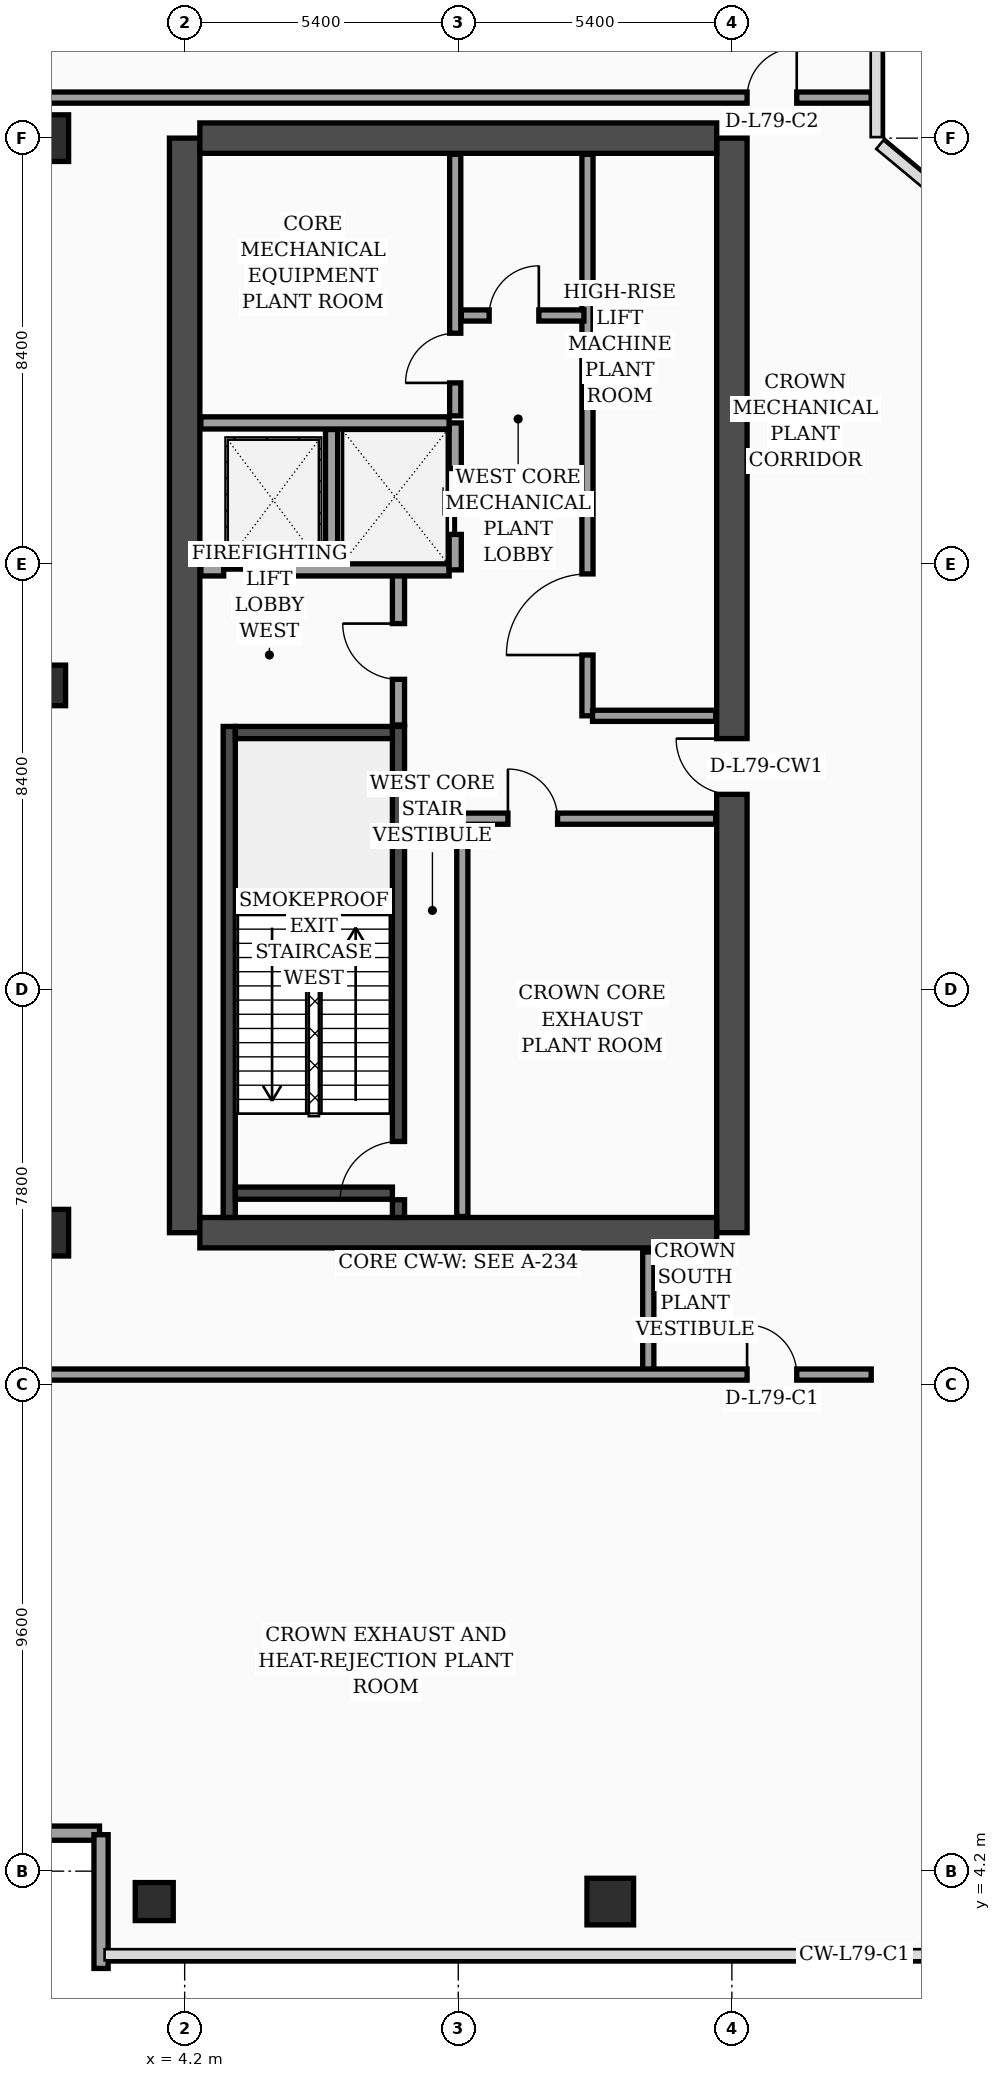
"""IFC4 building model, lengths in metres.
Left out: names, types, materials, properties, quantities, classifications, styles, units other than length and angle.
Written with IfcOpenShell. Run it as: python <this file> out.ifc"""

import sys

from ifc_helpers import new_model, si_unit, direction, frame, frame_2d, origin, origin_2d, place, context, subcontext, project, spatial, rectangle, hollow_rectangle, extrude, element, fill, save


model = new_model("IFC4")
c1 = context("Model", 3, precision=1e-05, world=origin(), true_north=direction((0.0, 1.0)))
c2 = subcontext(c1, "Body", "Model", "MODEL_VIEW")
j1 = project(units=[si_unit("LENGTHUNIT", "METRE"), si_unit("PLANEANGLEUNIT", "RADIAN")], contexts=[c1])
p1 = place(None, origin())
s1 = spatial("IfcSite", under=j1, at=p1, CompositionType="ELEMENT")
p2 = place(p1, origin())
s2 = spatial("IfcBuilding", under=s1, at=p2, CompositionType="ELEMENT")
p3 = place(p2, frame((0.0, 0.0, 320.5)))
s3 = spatial("IfcBuildingStorey", under=s2, at=p3, CompositionType="ELEMENT", Elevation=320.5)
p4 = place(p3, frame((4.2, 16.8, 0.0), z_axis=(0.0, 0.0, 1.0), x_axis=(0.0, 1.0, 0.0)))
e1 = element("IfcWall", 1, at=p4, inside=s3, PredefinedType="SHEAR", context=c2, shape_type="SweptSolid", body=[
    extrude(rectangle(XDim=21.6, YDim=0.6, at=frame_2d((10.8, 0.0))), origin(), (0.0, 0.0, 1.0), 4.76),
])
p5 = place(p3, frame((15.0, 16.8, 0.0), z_axis=(0.0, 0.0, 1.0), x_axis=(0.0, 1.0, 0.0)))
e2 = element("IfcWall", 2, at=p5, inside=s3, PredefinedType="SHEAR", context=c2, shape_type="SweptSolid", body=[
    extrude(rectangle(XDim=21.6, YDim=0.6, at=frame_2d((10.8, 0.0))), origin(), (0.0, 0.0, 1.0), 4.76),
])
p6 = place(p5, frame((8.65, 0.0, 0.0)))
e3 = element("IfcOpeningElement", 3, at=p6, cuts=e2, PredefinedType="OPENING", context=c2, shape_type="SweptSolid", body=[
    extrude(rectangle(XDim=1.1, YDim=2.2, at=frame_2d((0.55, 1.1))), frame((0.0, 0.31, 0.0), z_axis=(0.0, -1.0, 0.0), x_axis=(1.0, 0.0, 0.0)), (0.0, 0.0, 1.0), 0.62),
])
for number, where, z_axis, x_axis in (
    (4, (4.5, 38.4, 0.0), (0.0, 0.0, 1.0), (1.0, 0.0, 0.0)),
    (5, (4.5, 16.8, 0.0), (0.0, 0.0, 1.0), (1.0, 0.0, 0.0)),
):
    element("IfcWall", number, at=place(p3, frame(where, z_axis=z_axis, x_axis=x_axis)), inside=s3, PredefinedType="SHEAR", context=c2, shape_type="SweptSolid", body=[
        extrude(rectangle(XDim=10.2, YDim=0.6, at=frame_2d((5.1, 0.0))), origin(), (0.0, 0.0, 1.0), 4.76),
    ])
p7 = place(p3, frame((5.08, 17.1, 0.0), z_axis=(0.0, 0.0, 1.0), x_axis=(0.0, 1.0, 0.0)))
e6 = element("IfcWall", 6, at=p7, inside=s3, PredefinedType="SOLIDWALL", context=c2, shape_type="SweptSolid", body=[
    extrude(rectangle(XDim=9.69, YDim=0.24, at=frame_2d((4.845, 0.0))), origin(), (0.0, 0.0, 1.0), 4.76),
])
p8 = place(p3, frame((8.42, 17.1, 0.0), z_axis=(0.0, 0.0, 1.0), x_axis=(0.0, 1.0, 0.0)))
e7 = element("IfcWall", 7, at=p8, inside=s3, PredefinedType="SOLIDWALL", context=c2, shape_type="SweptSolid", body=[
    extrude(rectangle(XDim=9.69, YDim=0.24, at=frame_2d((4.845, 0.0))), origin(), (0.0, 0.0, 1.0), 4.76),
])
p9 = place(p8, frame((0.35, 0.0, 0.0)))
e8 = element("IfcOpeningElement", 8, at=p9, cuts=e7, PredefinedType="OPENING", context=c2, shape_type="SweptSolid", body=[
    extrude(rectangle(XDim=1.15, YDim=2.2, at=frame_2d((0.575, 1.1))), frame((0.0, 0.13, 0.0), z_axis=(0.0, -1.0, 0.0), x_axis=(1.0, 0.0, 0.0)), (0.0, 0.0, 1.0), 0.26),
])
for number, where, z_axis, x_axis in (
    (9, (5.2, 17.58, 0.0), (0.0, 0.0, 1.0), (1.0, 0.0, 0.0)),
    (10, (5.2, 26.67, 0.0), (0.0, 0.0, 1.0), (1.0, 0.0, 0.0)),
):
    element("IfcWall", number, at=place(p3, frame(where, z_axis=z_axis, x_axis=x_axis)), inside=s3, PredefinedType="SOLIDWALL", context=c2, shape_type="SweptSolid", body=[
        extrude(rectangle(XDim=3.1, YDim=0.24, at=frame_2d((1.55, 0.0))), origin(), (0.0, 0.0, 1.0), 4.76),
    ])
p10 = place(p3, frame((3.6, 3.6, 0.0), z_axis=(0.0, 0.0, 1.0), x_axis=(1.0, 0.0, 0.0)))
e11 = element("IfcColumn", 11, at=p10, inside=s3, PredefinedType="COLUMN", context=c2, shape_type="SweptSolid", body=[
    extrude(hollow_rectangle(XDim=0.75, YDim=0.75, WallThickness=0.032, at=origin_2d()), origin(), (0.0, 0.0, 1.0), 4.76),
])
p11 = place(p3, frame((1.45, 16.8, 0.0), z_axis=(0.0, 0.0, 1.0), x_axis=(1.0, 0.0, 0.0)))
e12 = element("IfcColumn", 12, at=p11, inside=s3, PredefinedType="COLUMN", context=c2, shape_type="SweptSolid", body=[
    extrude(rectangle(XDim=0.92, YDim=0.92, at=origin_2d()), origin(), (0.0, 0.0, 1.0), 4.76),
])
p12 = place(p3, frame((1.45, 27.6, 0.0), z_axis=(0.0, 0.0, 1.0), x_axis=(1.0, 0.0, 0.0)))
e13 = element("IfcColumn", 13, at=p12, inside=s3, PredefinedType="COLUMN", context=c2, shape_type="SweptSolid", body=[
    extrude(rectangle(XDim=0.8, YDim=0.8, at=origin_2d()), origin(), (0.0, 0.0, 1.0), 4.76),
])
for number, where, z_axis, x_axis in (
    (14, (1.45, 38.4, 0.0), (0.0, 0.0, 1.0), (1.0, 0.0, 0.0)),
    (15, (12.6, 3.6, 0.0), (0.0, 0.0, 1.0), (1.0, 0.0, 0.0)),
):
    element("IfcColumn", number, at=place(p3, frame(where, z_axis=z_axis, x_axis=x_axis)), inside=s3, PredefinedType="COLUMN", context=c2, shape_type="SweptSolid", body=[
        extrude(rectangle(XDim=0.92, YDim=0.92, at=origin_2d()), origin(), (0.0, 0.0, 1.0), 4.76),
    ])
p13 = place(p3, frame((-0.12, 4.95, 0.0), z_axis=(0.0, 0.0, 1.0), x_axis=(1.0, 0.0, 0.0)))
e16 = element("IfcWall", 16, at=p13, inside=s3, PredefinedType="SOLIDWALL", context=c2, shape_type="SweptSolid", body=[
    extrude(rectangle(XDim=2.64, YDim=0.28, at=frame_2d((1.32, 0.0))), origin(), (0.0, 0.0, 1.0), 4.76),
])
p14 = place(p3, frame((2.55, 4.92, 0.0), z_axis=(0.0, 0.0, 1.0), x_axis=(0.0, -1.0, 0.0)))
e17 = element("IfcWall", 17, at=p14, inside=s3, PredefinedType="SOLIDWALL", context=c2, shape_type="SweptSolid", body=[
    extrude(rectangle(XDim=2.64, YDim=0.28, at=frame_2d((1.32, 0.0))), origin(), (0.0, 0.0, 1.0), 4.76),
])
p15 = place(p3, frame((8.42, 26.82, 0.0), z_axis=(0.0, 0.0, 1.0), x_axis=(0.0, 1.0, 0.0)))
e18 = element("IfcWall", 18, at=p15, inside=s3, PredefinedType="SOLIDWALL", context=c2, shape_type="SweptSolid", body=[
    extrude(rectangle(XDim=3.0, YDim=0.24, at=frame_2d((1.5, 0.0))), origin(), (0.0, 0.0, 1.0), 4.76),
])
p16 = place(p15, frame((0.9, 0.0, 0.0)))
e19 = element("IfcOpeningElement", 19, at=p16, cuts=e18, PredefinedType="OPENING", context=c2, shape_type="SweptSolid", body=[
    extrude(rectangle(XDim=1.1, YDim=2.2, at=frame_2d((0.55, 1.1))), frame((0.0, 0.13, 0.0), z_axis=(0.0, -1.0, 0.0), x_axis=(1.0, 0.0, 0.0)), (0.0, 0.0, 1.0), 0.26),
])
p17 = place(p3, frame((4.52, 29.88, 0.0), z_axis=(0.0, 0.0, 1.0), x_axis=(1.0, 0.0, 0.0)))
e20 = element("IfcWall", 20, at=p17, inside=s3, PredefinedType="SOLIDWALL", context=c2, shape_type="SweptSolid", body=[
    extrude(rectangle(XDim=4.9, YDim=0.24, at=frame_2d((2.45, 0.0))), origin(), (0.0, 0.0, 1.0), 4.76),
])
p18 = place(p17, frame((0.45, 0.0, 0.0)))
e21 = element("IfcOpeningElement", 21, at=p18, cuts=e20, PredefinedType="OPENING", context=c2, shape_type="SweptSolid", body=[
    extrude(rectangle(XDim=1.3, YDim=2.35, at=frame_2d((0.65, 1.175))), frame((0.0, 0.13, 0.0), z_axis=(0.0, -1.0, 0.0), x_axis=(1.0, 0.0, 0.0)), (0.0, 0.0, 1.0), 0.26),
])
p19 = place(p3, frame((7.1, 30.02, 0.0), z_axis=(0.0, 0.0, 1.0), x_axis=(0.0, 1.0, 0.0)))
e22 = element("IfcWall", 22, at=p19, inside=s3, PredefinedType="SOLIDWALL", context=c2, shape_type="SweptSolid", body=[
    extrude(rectangle(XDim=2.63, YDim=0.24, at=frame_2d((1.315, 0.0))), origin(), (0.0, 0.0, 1.0), 4.76),
])
p20 = place(p3, frame((9.54, 29.88, 0.0), z_axis=(0.0, 0.0, 1.0), x_axis=(0.0, 1.0, 0.0)))
e23 = element("IfcWall", 23, at=p20, inside=s3, PredefinedType="SOLIDWALL", context=c2, shape_type="SweptSolid", body=[
    extrude(rectangle(XDim=2.9, YDim=0.24, at=frame_2d((1.45, 0.0))), origin(), (0.0, 0.0, 1.0), 4.76),
])
p21 = place(p20, frame((0.7, 0.0, 0.0)))
e24 = element("IfcOpeningElement", 24, at=p21, cuts=e23, PredefinedType="OPENING", context=c2, shape_type="SweptSolid", body=[
    extrude(rectangle(XDim=1.3, YDim=2.35, at=frame_2d((0.65, 1.175))), frame((0.0, 0.13, 0.0), z_axis=(0.0, -1.0, 0.0), x_axis=(1.0, 0.0, 0.0)), (0.0, 0.0, 1.0), 0.26),
])
p22 = place(p3, frame((4.52, 32.78, 0.0), z_axis=(0.0, 0.0, 1.0), x_axis=(1.0, 0.0, 0.0)))
e25 = element("IfcWall", 25, at=p22, inside=s3, PredefinedType="SOLIDWALL", context=c2, shape_type="SweptSolid", body=[
    extrude(rectangle(XDim=4.9, YDim=0.24, at=frame_2d((2.45, 0.0))), origin(), (0.0, 0.0, 1.0), 4.76),
])
p23 = place(p3, frame((9.68, 17.12, 0.0), z_axis=(0.0, 0.0, 1.0), x_axis=(0.0, 1.0, 0.0)))
e26 = element("IfcWall", 26, at=p23, inside=s3, PredefinedType="SOLIDWALL", context=c2, shape_type="SweptSolid", body=[
    extrude(rectangle(XDim=7.88, YDim=0.22, at=frame_2d((3.94, 0.0))), origin(), (0.0, 0.0, 1.0), 4.76),
])
p24 = place(p3, frame((9.54, 32.92, 0.0), z_axis=(0.0, 0.0, 1.0), x_axis=(0.0, 1.0, 0.0)))
e27 = element("IfcWall", 27, at=p24, inside=s3, PredefinedType="SOLIDWALL", context=c2, shape_type="SweptSolid", body=[
    extrude(rectangle(XDim=5.16, YDim=0.22, at=frame_2d((2.58, 0.0))), origin(), (0.0, 0.0, 1.0), 4.76),
])
p25 = place(p24, frame((0.65, 0.0, 0.0)))
e28 = element("IfcOpeningElement", 28, at=p25, cuts=e27, PredefinedType="OPENING", context=c2, shape_type="SweptSolid", body=[
    extrude(rectangle(XDim=0.98, YDim=2.15, at=frame_2d((0.49, 1.075))), frame((0.0, 0.12, 0.0), z_axis=(0.0, -1.0, 0.0), x_axis=(1.0, 0.0, 0.0)), (0.0, 0.0, 1.0), 0.24),
])
p26 = place(p3, frame((9.68, 24.97, 0.0), z_axis=(0.0, 0.0, 1.0), x_axis=(1.0, 0.0, 0.0)))
e29 = element("IfcWall", 29, at=p26, inside=s3, PredefinedType="SOLIDWALL", context=c2, shape_type="SweptSolid", body=[
    extrude(rectangle(XDim=5.0, YDim=0.22, at=frame_2d((2.5, 0.0))), origin(), (0.0, 0.0, 1.0), 4.76),
])
p27 = place(p26, frame((0.9, 0.0, 0.0)))
e30 = element("IfcOpeningElement", 30, at=p27, cuts=e29, PredefinedType="OPENING", context=c2, shape_type="SweptSolid", body=[
    extrude(rectangle(XDim=0.98, YDim=2.15, at=frame_2d((0.49, 1.075))), frame((0.0, 0.12, 0.0), z_axis=(0.0, -1.0, 0.0), x_axis=(1.0, 0.0, 0.0)), (0.0, 0.0, 1.0), 0.24),
])
p28 = place(p3, frame((12.15, 27.0, 0.0), z_axis=(0.0, 0.0, 1.0), x_axis=(0.0, 1.0, 0.0)))
e31 = element("IfcWall", 31, at=p28, inside=s3, PredefinedType="SOLIDWALL", context=c2, shape_type="SweptSolid", body=[
    extrude(rectangle(XDim=11.08, YDim=0.22, at=frame_2d((5.54, 0.0))), origin(), (0.0, 0.0, 1.0), 4.76),
])
p29 = place(p28, frame((1.2, 0.0, 0.0)))
e32 = element("IfcOpeningElement", 32, at=p29, cuts=e31, PredefinedType="OPENING", context=c2, shape_type="SweptSolid", body=[
    extrude(rectangle(XDim=1.6, YDim=2.35, at=frame_2d((0.8, 1.175))), frame((0.0, 0.12, 0.0), z_axis=(0.0, -1.0, 0.0), x_axis=(1.0, 0.0, 0.0)), (0.0, 0.0, 1.0), 0.24),
])
p30 = place(p3, frame((12.25, 27.0, 0.0), z_axis=(0.0, 0.0, 1.0), x_axis=(1.0, 0.0, 0.0)))
e33 = element("IfcWall", 33, at=p30, inside=s3, PredefinedType="SOLIDWALL", context=c2, shape_type="SweptSolid", body=[
    extrude(rectangle(XDim=2.43, YDim=0.22, at=frame_2d((1.215, 0.0))), origin(), (0.0, 0.0, 1.0), 4.76),
])
p31 = place(p3, frame((9.66, 34.9, 0.0), z_axis=(0.0, 0.0, 1.0), x_axis=(1.0, 0.0, 0.0)))
e34 = element("IfcWall", 34, at=p31, inside=s3, PredefinedType="SOLIDWALL", context=c2, shape_type="SweptSolid", body=[
    extrude(rectangle(XDim=2.42, YDim=0.22, at=frame_2d((1.21, 0.0))), origin(), (0.0, 0.0, 1.0), 4.76),
])
p32 = place(p31, frame((0.55, 0.0, 0.0)))
e35 = element("IfcOpeningElement", 35, at=p32, cuts=e34, PredefinedType="OPENING", context=c2, shape_type="SweptSolid", body=[
    extrude(rectangle(XDim=0.98, YDim=2.15, at=frame_2d((0.49, 1.075))), frame((0.0, 0.12, 0.0), z_axis=(0.0, -1.0, 0.0), x_axis=(1.0, 0.0, 0.0)), (0.0, 0.0, 1.0), 0.24),
])
p33 = place(p3, frame((13.35, 14.0, 0.0), z_axis=(0.0, 0.0, 1.0), x_axis=(0.0, 1.0, 0.0)))
e36 = element("IfcWall", 36, at=p33, inside=s3, PredefinedType="SOLIDWALL", context=c2, shape_type="SweptSolid", body=[
    extrude(rectangle(XDim=2.42, YDim=0.22, at=frame_2d((1.21, 0.0))), origin(), (0.0, 0.0, 1.0), 4.76),
])
p34 = place(p3, frame((0.08, 14.0, 0.0), z_axis=(0.0, 0.0, 1.0), x_axis=(1.0, 0.0, 0.0)))
e37 = element("IfcWall", 37, at=p34, inside=s3, PredefinedType="SOLIDWALL", context=c2, shape_type="SweptSolid", body=[
    extrude(rectangle(XDim=17.67, YDim=0.22, at=frame_2d((8.835, 0.0))), origin(), (0.0, 0.0, 1.0), 4.19),
])
p35 = place(p34, frame((15.22, 0.0, 0.0)))
e38 = element("IfcOpeningElement", 38, at=p35, cuts=e37, PredefinedType="OPENING", context=c2, shape_type="SweptSolid", body=[
    extrude(rectangle(XDim=0.98, YDim=2.15, at=frame_2d((0.49, 1.075))), frame((0.0, 0.12, 0.0), z_axis=(0.0, -1.0, 0.0), x_axis=(1.0, 0.0, 0.0)), (0.0, 0.0, 1.0), 0.24),
])
p36 = place(p3, frame((0.08, 39.2, 0.0), z_axis=(0.0, 0.0, 1.0), x_axis=(1.0, 0.0, 0.0)))
e39 = element("IfcWall", 39, at=p36, inside=s3, PredefinedType="SOLIDWALL", context=c2, shape_type="SweptSolid", body=[
    extrude(rectangle(XDim=17.67, YDim=0.22, at=frame_2d((8.835, 0.0))), origin(), (0.0, 0.0, 1.0), 4.19),
])
p37 = place(p36, frame((15.22, 0.0, 0.0)))
e40 = element("IfcOpeningElement", 40, at=p37, cuts=e39, PredefinedType="OPENING", context=c2, shape_type="SweptSolid", body=[
    extrude(rectangle(XDim=0.98, YDim=2.15, at=frame_2d((0.49, 1.075))), frame((0.0, 0.12, 0.0), z_axis=(0.0, -1.0, 0.0), x_axis=(1.0, 0.0, 0.0)), (0.0, 0.0, 1.0), 0.24),
])
p38 = place(p16, origin())
e41 = element("IfcDoor", 41, at=p38, inside=s3, OperationType="SINGLE_SWING_RIGHT", PredefinedType="DOOR", context=c2, shape_type="SweptSolid", body=[
    extrude(rectangle(XDim=1.1, YDim=2.2, at=frame_2d((0.55, 1.1))), frame((0.0, 0.025, 0.0), z_axis=(0.0, -1.0, 0.0), x_axis=(1.0, 0.0, 0.0)), (0.0, 0.0, 1.0), 0.05),
])
fill(e19, e41)
p39 = place(p18, origin())
e42 = element("IfcDoor", 42, at=p39, inside=s3, OperationType="DOUBLE_DOOR_SLIDING", PredefinedType="DOOR", context=c2, shape_type="SweptSolid", body=[
    extrude(rectangle(XDim=1.3, YDim=2.35, at=frame_2d((0.65, 1.175))), frame((0.0, 0.025, 0.0), z_axis=(0.0, -1.0, 0.0), x_axis=(1.0, 0.0, 0.0)), (0.0, 0.0, 1.0), 0.05),
])
fill(e21, e42)
p40 = place(p21, origin())
e43 = element("IfcDoor", 43, at=p40, inside=s3, OperationType="DOUBLE_DOOR_SLIDING", PredefinedType="DOOR", context=c2, shape_type="SweptSolid", body=[
    extrude(rectangle(XDim=1.3, YDim=2.35, at=frame_2d((0.65, 1.175))), frame((0.0, 0.025, 0.0), z_axis=(0.0, -1.0, 0.0), x_axis=(1.0, 0.0, 0.0)), (0.0, 0.0, 1.0), 0.05),
])
fill(e24, e43)
p41 = place(p25, origin())
e44 = element("IfcDoor", 44, at=p41, inside=s3, OperationType="SINGLE_SWING_LEFT", PredefinedType="DOOR", context=c2, shape_type="SweptSolid", body=[
    extrude(rectangle(XDim=0.98, YDim=2.15, at=frame_2d((0.49, 1.075))), frame((0.0, 0.025, 0.0), z_axis=(0.0, -1.0, 0.0), x_axis=(1.0, 0.0, 0.0)), (0.0, 0.0, 1.0), 0.05),
])
fill(e28, e44)
p42 = place(p27, origin())
e45 = element("IfcDoor", 45, at=p42, inside=s3, OperationType="SINGLE_SWING_LEFT", PredefinedType="DOOR", context=c2, shape_type="SweptSolid", body=[
    extrude(rectangle(XDim=0.98, YDim=2.15, at=frame_2d((0.49, 1.075))), frame((0.0, 0.025, 0.0), z_axis=(0.0, -1.0, 0.0), x_axis=(1.0, 0.0, 0.0)), (0.0, 0.0, 1.0), 0.05),
])
fill(e30, e45)
p43 = place(p29, origin())
e46 = element("IfcDoor", 46, at=p43, inside=s3, OperationType="SINGLE_SWING_LEFT", PredefinedType="DOOR", context=c2, shape_type="SweptSolid", body=[
    extrude(rectangle(XDim=1.6, YDim=2.35, at=frame_2d((0.8, 1.175))), frame((0.0, 0.025, 0.0), z_axis=(0.0, -1.0, 0.0), x_axis=(1.0, 0.0, 0.0)), (0.0, 0.0, 1.0), 0.05),
])
fill(e32, e46)
p44 = place(p32, origin())
e47 = element("IfcDoor", 47, at=p44, inside=s3, OperationType="SINGLE_SWING_RIGHT", PredefinedType="DOOR", context=c2, shape_type="SweptSolid", body=[
    extrude(rectangle(XDim=0.98, YDim=2.15, at=frame_2d((0.49, 1.075))), frame((0.0, 0.025, 0.0), z_axis=(0.0, -1.0, 0.0), x_axis=(1.0, 0.0, 0.0)), (0.0, 0.0, 1.0), 0.05),
])
fill(e35, e47)
p45 = place(p35, origin())
e48 = element("IfcDoor", 48, at=p45, inside=s3, OperationType="SINGLE_SWING_LEFT", PredefinedType="DOOR", context=c2, shape_type="SweptSolid", body=[
    extrude(rectangle(XDim=0.98, YDim=2.15, at=frame_2d((0.49, 1.075))), frame((0.0, 0.025, 0.0), z_axis=(0.0, -1.0, 0.0), x_axis=(1.0, 0.0, 0.0)), (0.0, 0.0, 1.0), 0.05),
])
fill(e38, e48)
p46 = place(p37, origin())
e49 = element("IfcDoor", 49, at=p46, inside=s3, OperationType="SINGLE_SWING_RIGHT", PredefinedType="DOOR", context=c2, shape_type="SweptSolid", body=[
    extrude(rectangle(XDim=0.98, YDim=2.15, at=frame_2d((0.49, 1.075))), frame((0.0, 0.025, 0.0), z_axis=(0.0, -1.0, 0.0), x_axis=(1.0, 0.0, 0.0)), (0.0, 0.0, 1.0), 0.05),
])
fill(e40, e49)
p47 = place(p9, origin())
e50 = element("IfcDoor", 50, at=p47, inside=s3, OperationType="SINGLE_SWING_LEFT", PredefinedType="DOOR", context=c2, shape_type="SweptSolid", body=[
    extrude(rectangle(XDim=1.15, YDim=2.2, at=frame_2d((0.575, 1.1))), frame((0.0, 0.025, 0.0), z_axis=(0.0, -1.0, 0.0), x_axis=(1.0, 0.0, 0.0)), (0.0, 0.0, 1.0), 0.05),
])
fill(e8, e50)
p48 = place(p6, origin())
e51 = element("IfcDoor", 51, at=p48, inside=s3, OperationType="SINGLE_SWING_RIGHT", PredefinedType="DOOR", context=c2, shape_type="SweptSolid", body=[
    extrude(rectangle(XDim=1.1, YDim=2.2, at=frame_2d((0.55, 1.1))), frame((0.0, 0.025, 0.0), z_axis=(0.0, -1.0, 0.0), x_axis=(1.0, 0.0, 0.0)), (0.0, 0.0, 1.0), 0.05),
])
fill(e3, e51)
save(model, sys.argv[1])
